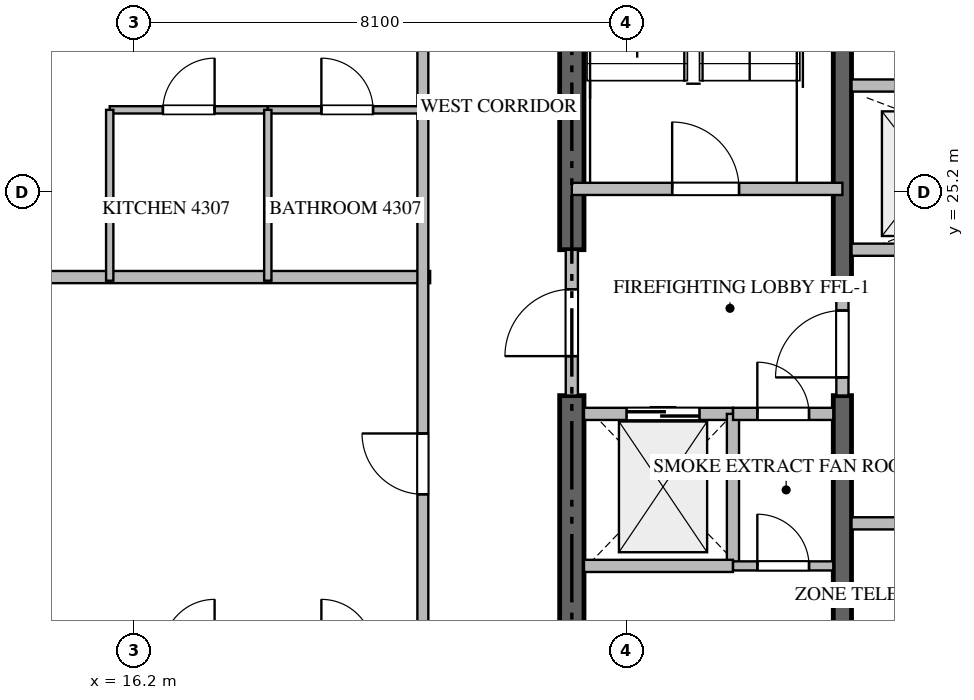
"""IFC4 building model, lengths in metres.
Left out: names, types, materials, properties, quantities, classifications, styles, units other than length and angle.
Written with IfcOpenShell. Run it as: python <this file> out.ifc"""

import sys

from ifc_helpers import new_model, si_unit, direction, frame, frame_2d, origin, place, context, subcontext, project, spatial, rectangle, extrude, source, transform, mapped, element, fill, save


model = new_model("IFC4")
c1 = context("Model", 3, precision=1e-05, world=origin(), true_north=direction((0.0, 1.0)))
c2 = subcontext(c1, "Body", "Model", "MODEL_VIEW")
j1 = project(units=[si_unit("LENGTHUNIT", "METRE"), si_unit("PLANEANGLEUNIT", "RADIAN")], contexts=[c1])
p1 = place(None, origin())
s1 = spatial("IfcSite", under=j1, at=p1, CompositionType="ELEMENT")
p2 = place(p1, origin())
s2 = spatial("IfcBuilding", under=s1, at=p2, CompositionType="ELEMENT")
p3 = place(p2, frame((0.0, 0.0, 172.65)))
s3 = spatial("IfcBuildingStorey", under=s2, at=p3, CompositionType="ELEMENT", Elevation=172.65)
p4 = place(p3, frame((23.4, 17.0, -0.26), z_axis=(0.0, 0.0, 1.0), x_axis=(0.0, 1.0, 0.0)))
e1 = element("IfcWall", 1, at=p4, inside=s3, PredefinedType="SHEAR", context=c2, shape_type="SweptSolid", body=[
    extrude(rectangle(XDim=4.85, YDim=0.4, at=frame_2d((2.425, 0.0))), origin(), (0.0, 0.0, 1.0), 3.748),
])
p5 = place(p3, frame((23.4, 24.25, -0.26), z_axis=(0.0, 0.0, 1.0), x_axis=(0.0, 1.0, 0.0)))
e2 = element("IfcWall", 2, at=p5, inside=s3, PredefinedType="SHEAR", context=c2, shape_type="SweptSolid", body=[
    extrude(rectangle(XDim=9.15, YDim=0.4, at=frame_2d((4.575, 0.0))), origin(), (0.0, 0.0, 1.0), 3.748),
])
p6 = place(p3, frame((27.85, 17.0, -0.26), z_axis=(0.0, 0.0, 1.0), x_axis=(0.0, 1.0, 0.0)))
e3 = element("IfcWall", 3, at=p6, inside=s3, PredefinedType="SHEAR", context=c2, shape_type="SweptSolid", body=[
    extrude(rectangle(XDim=4.85, YDim=0.3, at=frame_2d((2.425, 0.0))), origin(), (0.0, 0.0, 1.0), 3.748),
])
p7 = place(p3, frame((27.85, 23.55, -0.26), z_axis=(0.0, 0.0, 1.0), x_axis=(0.0, 1.0, 0.0)))
e4 = element("IfcWall", 4, at=p7, inside=s3, PredefinedType="SHEAR", context=c2, shape_type="SweptSolid", body=[
    extrude(rectangle(XDim=9.85, YDim=0.3, at=frame_2d((4.925, 0.0))), origin(), (0.0, 0.0, 1.0), 3.748),
])
p8 = place(p3, frame((23.4, 25.25, 0.0), z_axis=(0.0, 0.0, 1.0), x_axis=(1.0, 0.0, 0.0)))
e5 = element("IfcWall", 5, at=p8, inside=s3, PredefinedType="STANDARD", context=c2, shape_type="SweptSolid", body=[
    extrude(rectangle(XDim=4.45, YDim=0.2, at=frame_2d((2.225, 0.0))), origin(), (0.0, 0.0, 1.0), 3.49),
])
p9 = place(p8, frame((1.65, 0.0, 0.0)))
e6 = element("IfcOpeningElement", 6, at=p9, cuts=e5, PredefinedType="OPENING", context=c2, shape_type="SweptSolid", body=[
    extrude(rectangle(XDim=1.1, YDim=2.15, at=frame_2d((0.55, 1.075))), frame((0.0, 0.11, 0.0), z_axis=(0.0, -1.0, 0.0), x_axis=(1.0, 0.0, 0.0)), (0.0, 0.0, 1.0), 0.22),
])
p10 = place(p3, frame((23.6, 21.55, 0.0), z_axis=(0.0, 0.0, 1.0), x_axis=(1.0, 0.0, 0.0)))
e7 = element("IfcWall", 7, at=p10, inside=s3, PredefinedType="STANDARD", context=c2, shape_type="SweptSolid", body=[
    extrude(rectangle(XDim=2.45, YDim=0.2, at=frame_2d((1.225, 0.0))), origin(), (0.0, 0.0, 1.0), 3.49),
])
p11 = place(p10, frame((0.7, 0.0, 0.0)))
e8 = element("IfcOpeningElement", 8, at=p11, cuts=e7, PredefinedType="OPENING", context=c2, shape_type="SweptSolid", body=[
    extrude(rectangle(XDim=1.2, YDim=2.2, at=frame_2d((0.6, 1.1))), frame((0.0, 0.11, 0.0), z_axis=(0.0, -1.0, 0.0), x_axis=(1.0, 0.0, 0.0)), (0.0, 0.0, 1.0), 0.22),
])
p12 = place(p3, frame((28.0, 24.25, 0.0), z_axis=(0.0, 0.0, 1.0), x_axis=(1.0, 0.0, 0.0)))
e9 = element("IfcWall", 9, at=p12, inside=s3, PredefinedType="STANDARD", context=c2, shape_type="SweptSolid", body=[
    extrude(rectangle(XDim=2.425, YDim=0.2, at=frame_2d((1.212, 0.0))), origin(), (0.0, 0.0, 1.0), 3.49),
])
p13 = place(p12, frame((0.75, 0.0, 0.0)))
e10 = element("IfcOpeningElement", 10, at=p13, cuts=e9, PredefinedType="OPENING", context=c2, shape_type="SweptSolid", body=[
    extrude(rectangle(XDim=1.1, YDim=2.2, at=frame_2d((0.55, 1.1))), frame((0.0, 0.11, 0.0), z_axis=(0.0, -1.0, 0.0), x_axis=(1.0, 0.0, 0.0)), (0.0, 0.0, 1.0), 0.22),
])
p14 = place(p3, frame((26.05, 19.05, 0.0), z_axis=(0.0, 0.0, 1.0), x_axis=(0.0, 1.0, 0.0)))
e11 = element("IfcWall", 11, at=p14, inside=s3, PredefinedType="STANDARD", context=c2, shape_type="SweptSolid", body=[
    extrude(rectangle(XDim=2.5, YDim=0.2, at=frame_2d((1.25, 0.0))), origin(), (0.0, 0.0, 1.0), 3.49),
])
p15 = place(p3, frame((23.6, 19.05, 0.0), z_axis=(0.0, 0.0, 1.0), x_axis=(1.0, 0.0, 0.0)))
e12 = element("IfcWall", 12, at=p15, inside=s3, PredefinedType="STANDARD", context=c2, shape_type="SweptSolid", body=[
    extrude(rectangle(XDim=2.45, YDim=0.2, at=frame_2d((1.225, 0.0))), origin(), (0.0, 0.0, 1.0), 3.49),
])
p16 = place(p3, frame((26.052, 21.55, 0.0), z_axis=(0.0, 0.0, 1.0), x_axis=(1.0, 0.0, 0.0)))
e13 = element("IfcWall", 13, at=p16, inside=s3, PredefinedType="STANDARD", context=c2, shape_type="SweptSolid", body=[
    extrude(rectangle(XDim=1.648, YDim=0.2, at=frame_2d((0.824, 0.0))), origin(), (0.0, 0.0, 1.0), 3.49),
])
p17 = place(p16, frame((0.399, 0.0, 0.0)))
e14 = element("IfcOpeningElement", 14, at=p17, cuts=e13, PredefinedType="OPENING", context=c2, shape_type="SweptSolid", body=[
    extrude(rectangle(XDim=0.85, YDim=2.1, at=frame_2d((0.425, 1.05))), frame((0.0, 0.11, 0.0), z_axis=(0.0, -1.0, 0.0), x_axis=(1.0, 0.0, 0.0)), (0.0, 0.0, 1.0), 0.22),
])
p18 = place(p3, frame((23.4, 21.852, 0.0), z_axis=(0.0, 0.0, 1.0), x_axis=(0.0, 1.0, 0.0)))
e15 = element("IfcWall", 15, at=p18, inside=s3, PredefinedType="STANDARD", context=c2, shape_type="SweptSolid", body=[
    extrude(rectangle(XDim=2.396, YDim=0.2, at=frame_2d((1.198, 0.0))), origin(), (0.0, 0.0, 1.0), 3.49),
])
p19 = place(p18, frame((0.648, 0.0, 0.0)))
e16 = element("IfcOpeningElement", 16, at=p19, cuts=e15, PredefinedType="OPENING", context=c2, shape_type="SweptSolid", body=[
    extrude(rectangle(XDim=1.1, YDim=2.15, at=frame_2d((0.55, 1.075))), frame((0.0, 0.11, 0.0), z_axis=(0.0, -1.0, 0.0), x_axis=(1.0, 0.0, 0.0)), (0.0, 0.0, 1.0), 0.22),
])
p20 = place(p3, frame((27.85, 21.852, 0.0), z_axis=(0.0, 0.0, 1.0), x_axis=(0.0, 1.0, 0.0)))
e17 = element("IfcWall", 17, at=p20, inside=s3, PredefinedType="STANDARD", context=c2, shape_type="SweptSolid", body=[
    extrude(rectangle(XDim=1.696, YDim=0.2, at=frame_2d((0.848, 0.0))), origin(), (0.0, 0.0, 1.0), 3.49),
])
p21 = place(p20, frame((0.298, 0.0, 0.0)))
e18 = element("IfcOpeningElement", 18, at=p21, cuts=e17, PredefinedType="OPENING", context=c2, shape_type="SweptSolid", body=[
    extrude(rectangle(XDim=1.1, YDim=2.15, at=frame_2d((0.55, 1.075))), frame((0.0, 0.11, 0.0), z_axis=(0.0, -1.0, 0.0), x_axis=(1.0, 0.0, 0.0)), (0.0, 0.0, 1.0), 0.22),
])
p22 = place(p3, frame((28.0, 26.95, 0.0), z_axis=(0.0, 0.0, 1.0), x_axis=(1.0, 0.0, 0.0)))
e19 = element("IfcWall", 19, at=p22, inside=s3, PredefinedType="STANDARD", context=c2, shape_type="SweptSolid", body=[
    extrude(rectangle(XDim=6.95, YDim=0.2, at=frame_2d((3.475, 0.0))), origin(), (0.0, 0.0, 1.0), 3.49),
])
p23 = place(p3, frame((26.052, 19.05, 0.0), z_axis=(0.0, 0.0, 1.0), x_axis=(1.0, 0.0, 0.0)))
e20 = element("IfcWall", 20, at=p23, inside=s3, PredefinedType="PARTITIONING", context=c2, shape_type="SweptSolid", body=[
    extrude(rectangle(XDim=1.648, YDim=0.15, at=frame_2d((0.824, 0.0))), origin(), (0.0, 0.0, 1.0), 3.49),
])
p24 = place(p23, frame((0.399, 0.0, 0.0)))
e21 = element("IfcOpeningElement", 21, at=p24, cuts=e20, PredefinedType="OPENING", context=c2, shape_type="SweptSolid", body=[
    extrude(rectangle(XDim=0.85, YDim=2.1, at=frame_2d((0.425, 1.05))), frame((0.0, 0.085, 0.0), z_axis=(0.0, -1.0, 0.0), x_axis=(1.0, 0.0, 0.0)), (0.0, 0.0, 1.0), 0.17),
])
p25 = place(p3, frame((28.0, 19.75, 0.0), z_axis=(0.0, 0.0, 1.0), x_axis=(1.0, 0.0, 0.0)))
e22 = element("IfcWall", 22, at=p25, inside=s3, PredefinedType="STANDARD", context=c2, shape_type="SweptSolid", body=[
    extrude(rectangle(XDim=6.0, YDim=0.2, at=frame_2d((3.0, 0.0))), origin(), (0.0, 0.0, 1.0), 3.49),
])
p26 = place(p25, frame((2.55, 0.0, 0.0)))
e23 = element("IfcOpeningElement", 23, at=p26, cuts=e22, PredefinedType="OPENING", context=c2, shape_type="SweptSolid", body=[
    extrude(rectangle(XDim=0.9, YDim=2.1, at=frame_2d((0.45, 1.05))), frame((0.0, 0.11, 0.0), z_axis=(0.0, -1.0, 0.0), x_axis=(1.0, 0.0, 0.0)), (0.0, 0.0, 1.0), 0.22),
])
p27 = place(p3, frame((7.882, 23.8, 0.0), z_axis=(0.0, 0.0, 1.0), x_axis=(1.0, 0.0, 0.0)))
e24 = element("IfcWall", 24, at=p27, inside=s3, PredefinedType="PARTITIONING", context=c2, shape_type="SweptSolid", body=[
    extrude(rectangle(XDim=13.188, YDim=0.2, at=frame_2d((6.594, 0.0))), origin(), (0.0, 0.0, 1.0), 3.49),
])
p28 = place(p3, frame((20.95, 14.9, 0.0), z_axis=(0.0, 0.0, 1.0), x_axis=(0.0, 1.0, 0.0)))
e25 = element("IfcWall", 25, at=p28, inside=s3, PredefinedType="PARTITIONING", context=c2, shape_type="SweptSolid", body=[
    extrude(rectangle(XDim=18.7, YDim=0.18, at=frame_2d((9.35, 0.0))), origin(), (0.0, 0.0, 1.0), 3.49),
])
p29 = place(p28, frame((5.328, 0.0, 0.0)))
e26 = element("IfcOpeningElement", 26, at=p29, cuts=e25, PredefinedType="OPENING", context=c2, shape_type="SweptSolid", body=[
    extrude(rectangle(XDim=1.0, YDim=2.15, at=frame_2d((0.5, 1.075))), frame((0.0, 0.1, 0.0), z_axis=(0.0, -1.0, 0.0), x_axis=(1.0, 0.0, 0.0)), (0.0, 0.0, 1.0), 0.2),
])
p30 = place(p28, frame((14.62, 0.0, 0.0)))
e27 = element("IfcOpeningElement", 27, at=p30, cuts=e25, PredefinedType="OPENING", context=c2, shape_type="SweptSolid", body=[
    extrude(rectangle(XDim=1.0, YDim=2.15, at=frame_2d((0.5, 1.075))), frame((0.0, 0.1, 0.0), z_axis=(0.0, -1.0, 0.0), x_axis=(1.0, 0.0, 0.0)), (0.0, 0.0, 1.0), 0.2),
])
p31 = place(p3, frame((15.8, 26.55, 0.0), z_axis=(0.0, 0.0, 1.0), x_axis=(1.0, 0.0, 0.0)))
e28 = element("IfcWall", 28, at=p31, inside=s3, PredefinedType="PARTITIONING", context=c2, shape_type="SweptSolid", body=[
    extrude(rectangle(XDim=2.6, YDim=0.12, at=frame_2d((1.3, 0.0))), origin(), (0.0, 0.0, 1.0), 3.49),
])
p32 = place(p31, frame((0.875, 0.0, 0.0)))
e29 = element("IfcOpeningElement", 29, at=p32, cuts=e28, PredefinedType="OPENING", context=c2, shape_type="SweptSolid", body=[
    extrude(rectangle(XDim=0.85, YDim=2.1, at=frame_2d((0.425, 1.05))), frame((0.0, 0.07, 0.0), z_axis=(0.0, -1.0, 0.0), x_axis=(1.0, 0.0, 0.0)), (0.0, 0.0, 1.0), 0.14),
])
p33 = place(p3, frame((18.402, 26.55, 0.0), z_axis=(0.0, 0.0, 1.0), x_axis=(1.0, 0.0, 0.0)))
e30 = element("IfcWall", 30, at=p33, inside=s3, PredefinedType="PARTITIONING", context=c2, shape_type="SweptSolid", body=[
    extrude(rectangle(XDim=2.608, YDim=0.12, at=frame_2d((1.304, 0.0))), origin(), (0.0, 0.0, 1.0), 3.49),
])
p34 = place(p33, frame((0.879, 0.0, 0.0)))
e31 = element("IfcOpeningElement", 31, at=p34, cuts=e30, PredefinedType="OPENING", context=c2, shape_type="SweptSolid", body=[
    extrude(rectangle(XDim=0.85, YDim=2.1, at=frame_2d((0.425, 1.05))), frame((0.0, 0.07, 0.0), z_axis=(0.0, -1.0, 0.0), x_axis=(1.0, 0.0, 0.0)), (0.0, 0.0, 1.0), 0.14),
])
for number, where, z_axis, x_axis in (
    (32, (18.4, 23.74, 0.0), (0.0, 0.0, 1.0), (0.0, 1.0, 0.0)),
    (33, (15.8, 23.74, 0.0), (0.0, 0.0, 1.0), (0.0, 1.0, 0.0)),
):
    element("IfcWall", number, at=place(p3, frame(where, z_axis=z_axis, x_axis=x_axis)), inside=s3, PredefinedType="PARTITIONING", context=c2, shape_type="SweptSolid", body=[
        extrude(rectangle(XDim=2.81, YDim=0.12, at=frame_2d((1.405, 0.0))), origin(), (0.0, 0.0, 1.0), 3.49),
    ])
m1 = source(origin(), c2, "Body", "SweptSolid", [
    extrude(rectangle(XDim=1.1, YDim=2.15, at=frame_2d((0.55, 1.075))), frame((0.0, 0.025, 0.0), z_axis=(0.0, -1.0, 0.0), x_axis=(1.0, 0.0, 0.0)), (0.0, 0.0, 1.0), 0.05),
])
p35 = place(p9, origin())
e34 = element("IfcDoor", 34, at=p35, inside=s3, OperationType="SINGLE_SWING_LEFT", PredefinedType="DOOR", context=c2, shape_type="MappedRepresentation", body=[
    mapped(m1, transform((0.0, 0.0, 0.0), scale=1.0)),
])
fill(e6, e34)
m2 = source(origin(), c2, "Body", "SweptSolid", [
    extrude(rectangle(XDim=1.2, YDim=2.2, at=frame_2d((0.6, 1.1))), frame((0.0, 0.025, 0.0), z_axis=(0.0, -1.0, 0.0), x_axis=(1.0, 0.0, 0.0)), (0.0, 0.0, 1.0), 0.05),
])
p36 = place(p11, origin())
e35 = element("IfcDoor", 35, at=p36, inside=s3, OperationType="DOUBLE_DOOR_SLIDING", PredefinedType="DOOR", context=c2, shape_type="MappedRepresentation", body=[
    mapped(m2, transform((0.0, 0.0, 0.0), scale=1.0)),
])
fill(e8, e35)
m3 = source(origin(), c2, "Body", "SweptSolid", [
    extrude(rectangle(XDim=0.85, YDim=2.1, at=frame_2d((0.425, 1.05))), frame((0.0, 0.025, 0.0), z_axis=(0.0, -1.0, 0.0), x_axis=(1.0, 0.0, 0.0)), (0.0, 0.0, 1.0), 0.05),
])
p37 = place(p17, origin())
e36 = element("IfcDoor", 36, at=p37, inside=s3, OperationType="SINGLE_SWING_LEFT", PredefinedType="DOOR", context=c2, shape_type="MappedRepresentation", body=[
    mapped(m3, transform((0.0, 0.0, 0.0), scale=1.0)),
])
fill(e14, e36)
p38 = place(p19, origin())
e37 = element("IfcDoor", 37, at=p38, inside=s3, OperationType="SINGLE_SWING_LEFT", PredefinedType="DOOR", context=c2, shape_type="MappedRepresentation", body=[
    mapped(m1, transform((0.0, 0.0, 0.0), scale=1.0)),
])
fill(e16, e37)
p39 = place(p21, origin())
e38 = element("IfcDoor", 38, at=p39, inside=s3, OperationType="SINGLE_SWING_LEFT", PredefinedType="DOOR", context=c2, shape_type="MappedRepresentation", body=[
    mapped(m1, transform((0.0, 0.0, 0.0), scale=1.0)),
])
fill(e18, e38)
p40 = place(p24, origin())
e39 = element("IfcDoor", 39, at=p40, inside=s3, OperationType="SINGLE_SWING_LEFT", PredefinedType="DOOR", context=c2, shape_type="MappedRepresentation", body=[
    mapped(m3, transform((0.0, 0.0, 0.0), scale=1.0)),
])
fill(e21, e39)
m4 = source(origin(), c2, "Body", "SweptSolid", [
    extrude(rectangle(XDim=1.0, YDim=2.15, at=frame_2d((0.5, 1.075))), frame((0.0, 0.025, 0.0), z_axis=(0.0, -1.0, 0.0), x_axis=(1.0, 0.0, 0.0)), (0.0, 0.0, 1.0), 0.05),
])
p41 = place(p29, origin())
e40 = element("IfcDoor", 40, at=p41, inside=s3, OperationType="SINGLE_SWING_RIGHT", PredefinedType="DOOR", context=c2, shape_type="MappedRepresentation", body=[
    mapped(m4, transform((0.0, 0.0, 0.0), scale=1.0)),
])
fill(e26, e40)
p42 = place(p32, origin())
e41 = element("IfcDoor", 41, at=p42, inside=s3, OperationType="SINGLE_SWING_RIGHT", PredefinedType="DOOR", context=c2, shape_type="MappedRepresentation", body=[
    mapped(m3, transform((0.0, 0.0, 0.0), scale=1.0)),
])
fill(e29, e41)
p43 = place(p34, origin())
e42 = element("IfcDoor", 42, at=p43, inside=s3, OperationType="SINGLE_SWING_LEFT", PredefinedType="DOOR", context=c2, shape_type="MappedRepresentation", body=[
    mapped(m3, transform((0.0, 0.0, 0.0), scale=1.0)),
])
fill(e31, e42)
save(model, sys.argv[1])
